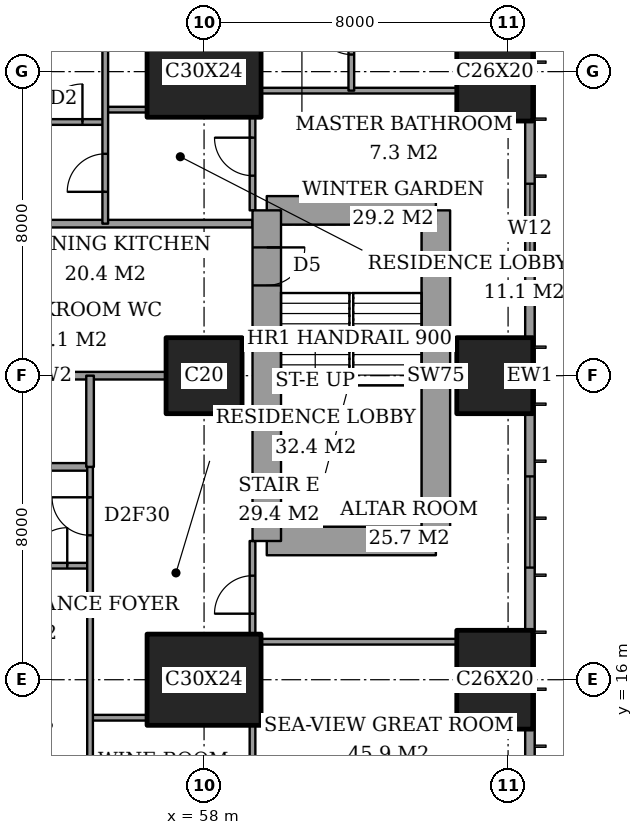
"""IFC4 building model, lengths in metres.
Left out: names, types, materials, properties, quantities, classifications, styles, units other than length and angle.
Written with IfcOpenShell. Run it as: python <this file> out.ifc"""

import sys

from ifc_helpers import new_model, si_unit, direction, frame, frame_2d, origin, origin_2d, place, context, subcontext, project, spatial, rectangle, extrude, element, fill, save


model = new_model("IFC4")
c1 = context("Model", 3, precision=1e-05, world=origin(), true_north=direction((0.0, 1.0)))
c2 = subcontext(c1, "Body", "Model", "MODEL_VIEW")
j1 = project(units=[si_unit("LENGTHUNIT", "METRE"), si_unit("PLANEANGLEUNIT", "RADIAN")], contexts=[c1])
p1 = place(None, origin())
s1 = spatial("IfcSite", under=j1, at=p1, CompositionType="ELEMENT")
p2 = place(p1, origin())
s2 = spatial("IfcBuilding", under=s1, at=p2, CompositionType="ELEMENT")
p3 = place(p2, frame((0.0, 0.0, 135.8)))
s3 = spatial("IfcBuildingStorey", under=s2, at=p3, CompositionType="ELEMENT", Elevation=135.8)
p4 = place(p3, frame((58.0, 16.0, 0.0), z_axis=(0.0, 0.0, 1.0), x_axis=(1.0, 0.0, 0.0)))
e1 = element("IfcColumn", 1, at=p4, inside=s3, PredefinedType="COLUMN", context=c2, shape_type="SweptSolid", body=[
    extrude(rectangle(XDim=3.0, YDim=2.4, at=origin_2d()), origin(), (0.0, 0.0, 1.0), 3.6),
])
p5 = place(p3, frame((58.0, 24.0, 0.0), z_axis=(0.0, 0.0, 1.0), x_axis=(1.0, 0.0, 0.0)))
e2 = element("IfcColumn", 2, at=p5, inside=s3, PredefinedType="COLUMN", context=c2, shape_type="SweptSolid", body=[
    extrude(rectangle(XDim=2.0, YDim=2.0, at=origin_2d()), origin(), (0.0, 0.0, 1.0), 3.6),
])
p6 = place(p3, frame((58.0, 32.0, 0.0), z_axis=(0.0, 0.0, 1.0), x_axis=(1.0, 0.0, 0.0)))
e3 = element("IfcColumn", 3, at=p6, inside=s3, PredefinedType="COLUMN", context=c2, shape_type="SweptSolid", body=[
    extrude(rectangle(XDim=3.0, YDim=2.4, at=origin_2d()), origin(), (0.0, 0.0, 1.0), 3.6),
])
p7 = place(p3, frame((65.65, 16.0, 0.0), z_axis=(0.0, 0.0, 1.0), x_axis=(0.0, 1.0, 0.0)))
e4 = element("IfcColumn", 4, at=p7, inside=s3, PredefinedType="COLUMN", context=c2, shape_type="SweptSolid", body=[
    extrude(rectangle(XDim=2.6, YDim=2.0, at=origin_2d()), origin(), (0.0, 0.0, 1.0), 3.6),
])
p8 = place(p3, frame((65.65, 24.0, 0.0), z_axis=(0.0, 0.0, 1.0), x_axis=(1.0, 0.0, 0.0)))
e5 = element("IfcColumn", 5, at=p8, inside=s3, PredefinedType="COLUMN", context=c2, shape_type="SweptSolid", body=[
    extrude(rectangle(XDim=2.0, YDim=2.0, at=origin_2d()), origin(), (0.0, 0.0, 1.0), 3.6),
])
p9 = place(p3, frame((65.65, 32.0, 0.0), z_axis=(0.0, 0.0, 1.0), x_axis=(0.0, 1.0, 0.0)))
e6 = element("IfcColumn", 6, at=p9, inside=s3, PredefinedType="COLUMN", context=c2, shape_type="SweptSolid", body=[
    extrude(rectangle(XDim=2.6, YDim=2.0, at=origin_2d()), origin(), (0.0, 0.0, 1.0), 3.6),
])
p10 = place(p3, frame((59.65, 19.65, 0.0), z_axis=(0.0, 0.0, 1.0), x_axis=(1.0, 0.0, 0.0)))
e7 = element("IfcWall", 7, at=p10, inside=s3, PredefinedType="SHEAR", context=c2, shape_type="SweptSolid", body=[
    extrude(rectangle(XDim=4.45, YDim=0.75, at=frame_2d((2.225, 0.0))), origin(), (0.0, 0.0, 1.0), 3.6),
])
p11 = place(p3, frame((64.1, 19.65, 0.0), z_axis=(0.0, 0.0, 1.0), x_axis=(0.0, 1.0, 0.0)))
e8 = element("IfcWall", 8, at=p11, inside=s3, PredefinedType="SHEAR", context=c2, shape_type="SweptSolid", body=[
    extrude(rectangle(XDim=8.7, YDim=0.75, at=frame_2d((4.35, 0.0))), origin(), (0.0, 0.0, 1.0), 3.6),
])
p12 = place(p3, frame((64.1, 28.35, 0.0), z_axis=(0.0, 0.0, 1.0), x_axis=(-1.0, 0.0, 0.0)))
e9 = element("IfcWall", 9, at=p12, inside=s3, PredefinedType="SHEAR", context=c2, shape_type="SweptSolid", body=[
    extrude(rectangle(XDim=4.45, YDim=0.75, at=frame_2d((2.225, 0.0))), origin(), (0.0, 0.0, 1.0), 3.6),
])
p13 = place(p3, frame((59.65, 28.35, 0.0), z_axis=(0.0, 0.0, 1.0), x_axis=(0.0, -1.0, 0.0)))
e10 = element("IfcWall", 10, at=p13, inside=s3, PredefinedType="SHEAR", context=c2, shape_type="SweptSolid", body=[
    extrude(rectangle(XDim=8.7, YDim=0.75, at=frame_2d((4.35, 0.0))), origin(), (0.0, 0.0, 1.0), 3.6),
])
p14 = place(p13, frame((0.975, 0.0, 0.0)))
e11 = element("IfcOpeningElement", 11, at=p14, cuts=e10, PredefinedType="OPENING", context=c2, shape_type="SweptSolid", body=[
    extrude(rectangle(XDim=1.0, YDim=2.1, at=frame_2d((0.5, 1.05))), frame((0.0, 0.385, 0.0), z_axis=(0.0, -1.0, 0.0), x_axis=(1.0, 0.0, 0.0)), (0.0, 0.0, 1.0), 0.77),
])
p15 = place(p3, frame((66.575, 3.175, 0.0), z_axis=(0.0, 0.0, 1.0), x_axis=(0.0, 1.0, 0.0)))
e12 = element("IfcWall", 12, at=p15, inside=s3, PredefinedType="SOLIDWALL", context=c2, shape_type="SweptSolid", body=[
    extrude(rectangle(XDim=41.65, YDim=0.25, at=frame_2d((20.825, 0.0))), origin(), (0.0, 0.0, 1.0), 3.6),
])
p16 = place(p15, frame((0.775, 0.0, 0.4)))
e13 = element("IfcOpeningElement", 13, at=p16, cuts=e12, PredefinedType="OPENING", context=c2, shape_type="SweptSolid", body=[
    extrude(rectangle(XDim=2.4, YDim=2.2, at=frame_2d((1.2, 1.1))), frame((0.0, 0.135, 0.0), z_axis=(0.0, -1.0, 0.0), x_axis=(1.0, 0.0, 0.0)), (0.0, 0.0, 1.0), 0.27),
])
p17 = place(p15, frame((6.1, 0.0, 0.4)))
e14 = element("IfcOpeningElement", 14, at=p17, cuts=e12, PredefinedType="OPENING", context=c2, shape_type="SweptSolid", body=[
    extrude(rectangle(XDim=1.2, YDim=2.2, at=frame_2d((0.6, 1.1))), frame((0.0, 0.135, 0.0), z_axis=(0.0, -1.0, 0.0), x_axis=(1.0, 0.0, 0.0)), (0.0, 0.0, 1.0), 0.27),
])
p18 = place(p15, frame((8.275, 0.0, 0.4)))
e15 = element("IfcOpeningElement", 15, at=p18, cuts=e12, PredefinedType="OPENING", context=c2, shape_type="SweptSolid", body=[
    extrude(rectangle(XDim=2.4, YDim=2.2, at=frame_2d((1.2, 1.1))), frame((0.0, 0.135, 0.0), z_axis=(0.0, -1.0, 0.0), x_axis=(1.0, 0.0, 0.0)), (0.0, 0.0, 1.0), 0.27),
])
p19 = place(p15, frame((15.775, 0.0, 0.4)))
e16 = element("IfcOpeningElement", 16, at=p19, cuts=e12, PredefinedType="OPENING", context=c2, shape_type="SweptSolid", body=[
    extrude(rectangle(XDim=2.4, YDim=2.2, at=frame_2d((1.2, 1.1))), frame((0.0, 0.135, 0.0), z_axis=(0.0, -1.0, 0.0), x_axis=(1.0, 0.0, 0.0)), (0.0, 0.0, 1.0), 0.27),
])
p20 = place(p15, frame((23.475, 0.0, 0.4)))
e17 = element("IfcOpeningElement", 17, at=p20, cuts=e12, PredefinedType="OPENING", context=c2, shape_type="SweptSolid", body=[
    extrude(rectangle(XDim=2.4, YDim=2.2, at=frame_2d((1.2, 1.1))), frame((0.0, 0.135, 0.0), z_axis=(0.0, -1.0, 0.0), x_axis=(1.0, 0.0, 0.0)), (0.0, 0.0, 1.0), 0.27),
])
p21 = place(p15, frame((30.975, 0.0, 0.4)))
e18 = element("IfcOpeningElement", 18, at=p21, cuts=e12, PredefinedType="OPENING", context=c2, shape_type="SweptSolid", body=[
    extrude(rectangle(XDim=2.4, YDim=2.2, at=frame_2d((1.2, 1.1))), frame((0.0, 0.135, 0.0), z_axis=(0.0, -1.0, 0.0), x_axis=(1.0, 0.0, 0.0)), (0.0, 0.0, 1.0), 0.27),
])
p22 = place(p15, frame((34.5, 0.0, 0.4)))
e19 = element("IfcOpeningElement", 19, at=p22, cuts=e12, PredefinedType="OPENING", context=c2, shape_type="SweptSolid", body=[
    extrude(rectangle(XDim=1.2, YDim=2.2, at=frame_2d((0.6, 1.1))), frame((0.0, 0.135, 0.0), z_axis=(0.0, -1.0, 0.0), x_axis=(1.0, 0.0, 0.0)), (0.0, 0.0, 1.0), 0.27),
])
p23 = place(p15, frame((38.475, 0.0, 0.4)))
e20 = element("IfcOpeningElement", 20, at=p23, cuts=e12, PredefinedType="OPENING", context=c2, shape_type="SweptSolid", body=[
    extrude(rectangle(XDim=2.4, YDim=2.2, at=frame_2d((1.2, 1.1))), frame((0.0, 0.135, 0.0), z_axis=(0.0, -1.0, 0.0), x_axis=(1.0, 0.0, 0.0)), (0.0, 0.0, 1.0), 0.27),
])
p24 = place(p3, frame((55.0, 15.0, 0.0), z_axis=(0.0, 0.0, 1.0), x_axis=(1.0, 0.0, 0.0)))
e21 = element("IfcWall", 21, at=p24, inside=s3, PredefinedType="PARTITIONING", context=c2, shape_type="SweptSolid", body=[
    extrude(rectangle(XDim=1.5, YDim=0.15, at=frame_2d((0.75, 0.0))), origin(), (0.0, 0.0, 1.0), 3.35),
])
p25 = place(p3, frame((59.5, 17.0, 0.0), z_axis=(0.0, 0.0, 1.0), x_axis=(1.0, 0.0, 0.0)))
e22 = element("IfcWall", 22, at=p25, inside=s3, PredefinedType="PARTITIONING", context=c2, shape_type="SweptSolid", body=[
    extrude(rectangle(XDim=5.15, YDim=0.15, at=frame_2d((2.575, 0.0))), origin(), (0.0, 0.0, 1.0), 3.35),
])
p26 = place(p3, frame((51.6, 19.0, 0.0), z_axis=(0.0, 0.0, 1.0), x_axis=(1.0, 0.0, 0.0)))
e23 = element("IfcWall", 23, at=p26, inside=s3, PredefinedType="PARTITIONING", context=c2, shape_type="SweptSolid", body=[
    extrude(rectangle(XDim=3.4, YDim=0.15, at=frame_2d((1.7, 0.0))), origin(), (0.0, 0.0, 1.0), 3.35),
])
p27 = place(p26, frame((1.8, 0.0, 0.0)))
e24 = element("IfcOpeningElement", 24, at=p27, cuts=e23, PredefinedType="OPENING", context=c2, shape_type="SweptSolid", body=[
    extrude(rectangle(XDim=1.0, YDim=2.1, at=frame_2d((0.5, 1.05))), frame((0.0, 0.085, 0.0), z_axis=(0.0, -1.0, 0.0), x_axis=(1.0, 0.0, 0.0)), (0.0, 0.0, 1.0), 0.17),
])
p28 = place(p3, frame((51.2, 21.6, 0.0), z_axis=(0.0, 0.0, 1.0), x_axis=(1.0, 0.0, 0.0)))
e25 = element("IfcWall", 25, at=p28, inside=s3, PredefinedType="PARTITIONING", context=c2, shape_type="SweptSolid", body=[
    extrude(rectangle(XDim=3.8, YDim=0.2, at=frame_2d((1.9, 0.0))), origin(), (0.0, 0.0, 1.0), 3.35),
])
p29 = place(p28, frame((1.45, 0.0, 0.0)))
e26 = element("IfcOpeningElement", 26, at=p29, cuts=e25, PredefinedType="OPENING", context=c2, shape_type="SweptSolid", body=[
    extrude(rectangle(XDim=0.9, YDim=2.1, at=frame_2d((0.45, 1.05))), frame((0.0, 0.11, 0.0), z_axis=(0.0, -1.0, 0.0), x_axis=(1.0, 0.0, 0.0)), (0.0, 0.0, 1.0), 0.22),
])
p30 = place(p3, frame((51.0, 24.0, 0.0), z_axis=(0.0, 0.0, 1.0), x_axis=(1.0, 0.0, 0.0)))
e27 = element("IfcWall", 27, at=p30, inside=s3, PredefinedType="PARTITIONING", context=c2, shape_type="SweptSolid", body=[
    extrude(rectangle(XDim=6.0, YDim=0.2, at=frame_2d((3.0, 0.0))), origin(), (0.0, 0.0, 1.0), 3.35),
])
p31 = place(p3, frame((42.0, 28.0, 0.0), z_axis=(0.0, 0.0, 1.0), x_axis=(1.0, 0.0, 0.0)))
e28 = element("IfcWall", 28, at=p31, inside=s3, PredefinedType="PARTITIONING", context=c2, shape_type="SweptSolid", body=[
    extrude(rectangle(XDim=17.275, YDim=0.2, at=frame_2d((8.637, 0.0))), origin(), (0.0, 0.0, 1.0), 3.35),
])
p32 = place(p31, frame((9.1, 0.0, 0.0)))
e29 = element("IfcOpeningElement", 29, at=p32, cuts=e28, PredefinedType="OPENING", context=c2, shape_type="SweptSolid", body=[
    extrude(rectangle(XDim=1.2, YDim=2.4, at=frame_2d((0.6, 1.2))), frame((0.0, 0.11, 0.0), z_axis=(0.0, -1.0, 0.0), x_axis=(1.0, 0.0, 0.0)), (0.0, 0.0, 1.0), 0.22),
])
p33 = place(p3, frame((51.6, 30.675, 0.0), z_axis=(0.0, 0.0, 1.0), x_axis=(1.0, 0.0, 0.0)))
e30 = element("IfcWall", 30, at=p33, inside=s3, PredefinedType="PARTITIONING", context=c2, shape_type="SweptSolid", body=[
    extrude(rectangle(XDim=3.8, YDim=0.15, at=frame_2d((1.9, 0.0))), origin(), (0.0, 0.0, 1.0), 3.35),
])
p34 = place(p33, frame((2.2, 0.0, 0.0)))
e31 = element("IfcOpeningElement", 31, at=p34, cuts=e30, PredefinedType="OPENING", context=c2, shape_type="SweptSolid", body=[
    extrude(rectangle(XDim=1.0, YDim=2.1, at=frame_2d((0.5, 1.05))), frame((0.0, 0.085, 0.0), z_axis=(0.0, -1.0, 0.0), x_axis=(1.0, 0.0, 0.0)), (0.0, 0.0, 1.0), 0.17),
])
p35 = place(p3, frame((55.4, 31.0, 0.0), z_axis=(0.0, 0.0, 1.0), x_axis=(1.0, 0.0, 0.0)))
e32 = element("IfcWall", 32, at=p35, inside=s3, PredefinedType="PARTITIONING", context=c2, shape_type="SweptSolid", body=[
    extrude(rectangle(XDim=1.1, YDim=0.15, at=frame_2d((0.55, 0.0))), origin(), (0.0, 0.0, 1.0), 3.35),
])
p36 = place(p3, frame((59.5, 31.5, 0.0), z_axis=(0.0, 0.0, 1.0), x_axis=(1.0, 0.0, 0.0)))
e33 = element("IfcWall", 33, at=p36, inside=s3, PredefinedType="PARTITIONING", context=c2, shape_type="SweptSolid", body=[
    extrude(rectangle(XDim=5.15, YDim=0.15, at=frame_2d((2.575, 0.0))), origin(), (0.0, 0.0, 1.0), 3.35),
])
p37 = place(p3, frame((55.0, 21.6, 0.0), z_axis=(0.0, 0.0, 1.0), x_axis=(0.0, 1.0, 0.0)))
e34 = element("IfcWall", 34, at=p37, inside=s3, PredefinedType="PARTITIONING", context=c2, shape_type="SweptSolid", body=[
    extrude(rectangle(XDim=2.4, YDim=0.2, at=frame_2d((1.2, 0.0))), origin(), (0.0, 0.0, 1.0), 3.35),
])
p38 = place(p3, frame((55.0, 10.6, 0.0), z_axis=(0.0, 0.0, 1.0), x_axis=(0.0, 1.0, 0.0)))
e35 = element("IfcWall", 35, at=p38, inside=s3, PredefinedType="PARTITIONING", context=c2, shape_type="SweptSolid", body=[
    extrude(rectangle(XDim=11.0, YDim=0.15, at=frame_2d((5.5, 0.0))), origin(), (0.0, 0.0, 1.0), 3.35),
])
p39 = place(p38, frame((9.2, 0.0, 0.0)))
e36 = element("IfcOpeningElement", 36, at=p39, cuts=e35, PredefinedType="OPENING", context=c2, shape_type="SweptSolid", body=[
    extrude(rectangle(XDim=1.0, YDim=2.1, at=frame_2d((0.5, 1.05))), frame((0.0, 0.085, 0.0), z_axis=(0.0, -1.0, 0.0), x_axis=(1.0, 0.0, 0.0)), (0.0, 0.0, 1.0), 0.17),
])
p40 = place(p3, frame((55.4, 28.0, 0.0), z_axis=(0.0, 0.0, 1.0), x_axis=(0.0, 1.0, 0.0)))
e37 = element("IfcWall", 37, at=p40, inside=s3, PredefinedType="PARTITIONING", context=c2, shape_type="SweptSolid", body=[
    extrude(rectangle(XDim=9.4, YDim=0.15, at=frame_2d((4.7, 0.0))), origin(), (0.0, 0.0, 1.0), 3.35),
])
p41 = place(p40, frame((0.837, 0.0, 0.0)))
e38 = element("IfcOpeningElement", 38, at=p41, cuts=e37, PredefinedType="OPENING", context=c2, shape_type="SweptSolid", body=[
    extrude(rectangle(XDim=1.0, YDim=2.1, at=frame_2d((0.5, 1.05))), frame((0.0, 0.085, 0.0), z_axis=(0.0, -1.0, 0.0), x_axis=(1.0, 0.0, 0.0)), (0.0, 0.0, 1.0), 0.17),
])
p42 = place(p3, frame((59.275, 10.6, 0.0), z_axis=(0.0, 0.0, 1.0), x_axis=(0.0, 1.0, 0.0)))
e39 = element("IfcWall", 39, at=p42, inside=s3, PredefinedType="PARTITIONING", context=c2, shape_type="SweptSolid", body=[
    extrude(rectangle(XDim=4.2, YDim=0.15, at=frame_2d((2.1, 0.0))), origin(), (0.0, 0.0, 1.0), 3.35),
])
p43 = place(p3, frame((59.275, 17.2, 0.0), z_axis=(0.0, 0.0, 1.0), x_axis=(0.0, 1.0, 0.0)))
e40 = element("IfcWall", 40, at=p43, inside=s3, PredefinedType="PARTITIONING", context=c2, shape_type="SweptSolid", body=[
    extrude(rectangle(XDim=2.45, YDim=0.15, at=frame_2d((1.225, 0.0))), origin(), (0.0, 0.0, 1.0), 3.35),
])
p44 = place(p43, frame((0.538, 0.0, 0.0)))
e41 = element("IfcOpeningElement", 41, at=p44, cuts=e40, PredefinedType="OPENING", context=c2, shape_type="SweptSolid", body=[
    extrude(rectangle(XDim=1.0, YDim=2.1, at=frame_2d((0.5, 1.05))), frame((0.0, 0.085, 0.0), z_axis=(0.0, -1.0, 0.0), x_axis=(1.0, 0.0, 0.0)), (0.0, 0.0, 1.0), 0.17),
])
p45 = place(p3, frame((59.275, 28.35, 0.0), z_axis=(0.0, 0.0, 1.0), x_axis=(0.0, 1.0, 0.0)))
e42 = element("IfcWall", 42, at=p45, inside=s3, PredefinedType="PARTITIONING", context=c2, shape_type="SweptSolid", body=[
    extrude(rectangle(XDim=2.45, YDim=0.15, at=frame_2d((1.225, 0.0))), origin(), (0.0, 0.0, 1.0), 3.35),
])
p46 = place(p45, frame((0.913, 0.0, 0.0)))
e43 = element("IfcOpeningElement", 43, at=p46, cuts=e42, PredefinedType="OPENING", context=c2, shape_type="SweptSolid", body=[
    extrude(rectangle(XDim=1.0, YDim=2.1, at=frame_2d((0.5, 1.05))), frame((0.0, 0.085, 0.0), z_axis=(0.0, -1.0, 0.0), x_axis=(1.0, 0.0, 0.0)), (0.0, 0.0, 1.0), 0.17),
])
p47 = place(p3, frame((61.875, 31.5, 0.0), z_axis=(0.0, 0.0, 1.0), x_axis=(0.0, 1.0, 0.0)))
e44 = element("IfcWall", 44, at=p47, inside=s3, PredefinedType="PARTITIONING", context=c2, shape_type="SweptSolid", body=[
    extrude(rectangle(XDim=2.8, YDim=0.15, at=frame_2d((1.4, 0.0))), origin(), (0.0, 0.0, 1.0), 3.35),
])
p48 = place(p47, frame((0.95, 0.0, 0.0)))
e45 = element("IfcOpeningElement", 45, at=p48, cuts=e44, PredefinedType="OPENING", context=c2, shape_type="SweptSolid", body=[
    extrude(rectangle(XDim=0.9, YDim=2.1, at=frame_2d((0.45, 1.05))), frame((0.0, 0.085, 0.0), z_axis=(0.0, -1.0, 0.0), x_axis=(1.0, 0.0, 0.0)), (0.0, 0.0, 1.0), 0.17),
])
p49 = place(p19, origin())
e46 = element("IfcWindow", 46, at=p49, inside=s3, PartitioningType="SINGLE_PANEL", PredefinedType="WINDOW", context=c2, shape_type="SweptSolid", body=[
    extrude(rectangle(XDim=2.4, YDim=2.2, at=frame_2d((1.2, 1.1))), frame((0.0, 0.03, 0.0), z_axis=(0.0, -1.0, 0.0), x_axis=(1.0, 0.0, 0.0)), (0.0, 0.0, 1.0), 0.06),
])
fill(e16, e46)
p50 = place(p20, origin())
e47 = element("IfcWindow", 47, at=p50, inside=s3, PartitioningType="SINGLE_PANEL", PredefinedType="WINDOW", context=c2, shape_type="SweptSolid", body=[
    extrude(rectangle(XDim=2.4, YDim=2.2, at=frame_2d((1.2, 1.1))), frame((0.0, 0.03, 0.0), z_axis=(0.0, -1.0, 0.0), x_axis=(1.0, 0.0, 0.0)), (0.0, 0.0, 1.0), 0.06),
])
fill(e17, e47)
p51 = place(p44, origin())
e48 = element("IfcDoor", 48, at=p51, inside=s3, OperationType="SINGLE_SWING_RIGHT", PredefinedType="DOOR", context=c2, shape_type="SweptSolid", body=[
    extrude(rectangle(XDim=1.0, YDim=2.1, at=frame_2d((0.5, 1.05))), frame((0.0, 0.025, 0.0), z_axis=(0.0, -1.0, 0.0), x_axis=(1.0, 0.0, 0.0)), (0.0, 0.0, 1.0), 0.05),
])
fill(e41, e48)
p52 = place(p39, origin())
e49 = element("IfcDoor", 49, at=p52, inside=s3, OperationType="SINGLE_SWING_LEFT", PredefinedType="DOOR", context=c2, shape_type="SweptSolid", body=[
    extrude(rectangle(XDim=1.0, YDim=2.1, at=frame_2d((0.5, 1.05))), frame((0.0, 0.025, 0.0), z_axis=(0.0, -1.0, 0.0), x_axis=(1.0, 0.0, 0.0)), (0.0, 0.0, 1.0), 0.05),
])
fill(e36, e49)
p53 = place(p27, origin())
e50 = element("IfcDoor", 50, at=p53, inside=s3, OperationType="SINGLE_SWING_LEFT", PredefinedType="DOOR", context=c2, shape_type="SweptSolid", body=[
    extrude(rectangle(XDim=1.0, YDim=2.1, at=frame_2d((0.5, 1.05))), frame((0.0, 0.025, 0.0), z_axis=(0.0, -1.0, 0.0), x_axis=(1.0, 0.0, 0.0)), (0.0, 0.0, 1.0), 0.05),
])
fill(e24, e50)
p54 = place(p48, origin())
e51 = element("IfcDoor", 51, at=p54, inside=s3, OperationType="SINGLE_SWING_LEFT", PredefinedType="DOOR", context=c2, shape_type="SweptSolid", body=[
    extrude(rectangle(XDim=0.9, YDim=2.1, at=frame_2d((0.45, 1.05))), frame((0.0, 0.025, 0.0), z_axis=(0.0, -1.0, 0.0), x_axis=(1.0, 0.0, 0.0)), (0.0, 0.0, 1.0), 0.05),
])
fill(e45, e51)
p55 = place(p46, origin())
e52 = element("IfcDoor", 52, at=p55, inside=s3, OperationType="SINGLE_SWING_LEFT", PredefinedType="DOOR", context=c2, shape_type="SweptSolid", body=[
    extrude(rectangle(XDim=1.0, YDim=2.1, at=frame_2d((0.5, 1.05))), frame((0.0, 0.025, 0.0), z_axis=(0.0, -1.0, 0.0), x_axis=(1.0, 0.0, 0.0)), (0.0, 0.0, 1.0), 0.05),
])
fill(e43, e52)
p56 = place(p41, origin())
e53 = element("IfcDoor", 53, at=p56, inside=s3, OperationType="SINGLE_SWING_RIGHT", PredefinedType="DOOR", context=c2, shape_type="SweptSolid", body=[
    extrude(rectangle(XDim=1.0, YDim=2.1, at=frame_2d((0.5, 1.05))), frame((0.0, 0.025, 0.0), z_axis=(0.0, -1.0, 0.0), x_axis=(1.0, 0.0, 0.0)), (0.0, 0.0, 1.0), 0.05),
])
fill(e38, e53)
p57 = place(p34, origin())
e54 = element("IfcDoor", 54, at=p57, inside=s3, OperationType="SINGLE_SWING_LEFT", PredefinedType="DOOR", context=c2, shape_type="SweptSolid", body=[
    extrude(rectangle(XDim=1.0, YDim=2.1, at=frame_2d((0.5, 1.05))), frame((0.0, 0.025, 0.0), z_axis=(0.0, -1.0, 0.0), x_axis=(1.0, 0.0, 0.0)), (0.0, 0.0, 1.0), 0.05),
])
fill(e31, e54)
p58 = place(p14, origin())
e55 = element("IfcDoor", 55, at=p58, inside=s3, OperationType="SINGLE_SWING_RIGHT", PredefinedType="DOOR", context=c2, shape_type="SweptSolid", body=[
    extrude(rectangle(XDim=1.0, YDim=2.1, at=frame_2d((0.5, 1.05))), frame((0.0, 0.025, 0.0), z_axis=(0.0, -1.0, 0.0), x_axis=(1.0, 0.0, 0.0)), (0.0, 0.0, 1.0), 0.05),
])
fill(e11, e55)
save(model, sys.argv[1])
